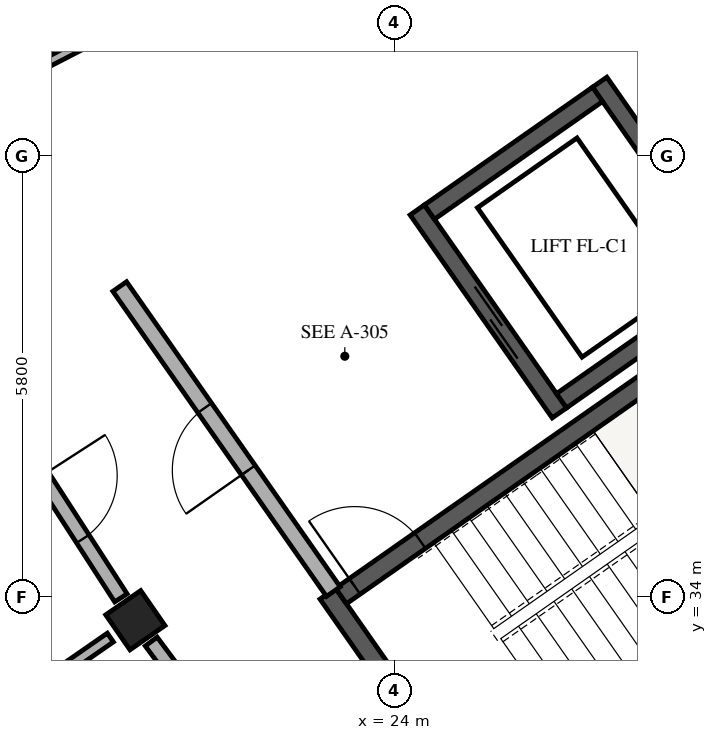
"""IFC4 building model, lengths in metres.
Left out: names, types, materials, properties, quantities, classifications, styles, units other than length and angle.
Written with IfcOpenShell. Run it as: python <this file> out.ifc"""

import sys

from ifc_helpers import new_model, si_unit, direction, frame, frame_2d, origin, origin_2d, place, context, subcontext, project, spatial, rectangle, extrude, element, fill, save


model = new_model("IFC4")
c1 = context("Model", 3, precision=1e-05, world=origin(), true_north=direction((0.0, 1.0)))
c2 = subcontext(c1, "Body", "Model", "MODEL_VIEW")
j1 = project(units=[si_unit("LENGTHUNIT", "METRE"), si_unit("PLANEANGLEUNIT", "RADIAN")], contexts=[c1])
p1 = place(None, origin())
s1 = spatial("IfcSite", under=j1, at=p1, CompositionType="ELEMENT")
p2 = place(p1, origin())
s2 = spatial("IfcBuilding", under=s1, at=p2, CompositionType="ELEMENT")
p3 = place(p2, frame((0.0, 0.0, 8.84)))
s3 = spatial("IfcBuildingStorey", under=s2, at=p3, CompositionType="ELEMENT", Elevation=8.84)
p4 = place(p3, frame((25.114, 31.414, 0.0), z_axis=(0.0, 0.0, 1.0), x_axis=(0.819141541656, 0.573591435374, 0.0)))
e1 = element("IfcWall", 1, at=p4, inside=s3, PredefinedType="SHEAR", context=c2, shape_type="SweptSolid", body=[
    extrude(rectangle(XDim=6.6, YDim=0.25, at=frame_2d((3.3, 0.0))), origin(), (0.0, 0.0, 1.0), 3.11),
])
p5 = place(p3, frame((25.083, 31.24, 0.0), z_axis=(0.0, 0.0, 1.0), x_axis=(-0.573582112484, 0.819148069789, 0.0)))
e2 = element("IfcWall", 2, at=p5, inside=s3, PredefinedType="SHEAR", context=c2, shape_type="SweptSolid", body=[
    extrude(rectangle(XDim=3.42, YDim=0.25, at=frame_2d((1.71, 0.0))), origin(), (0.0, 0.0, 1.0), 3.11),
])
p6 = place(p3, frame((23.296, 34.01, 0.0), z_axis=(0.0, 0.0, 1.0), x_axis=(0.819153711596, 0.573574055182, 0.0)))
e3 = element("IfcWall", 3, at=p6, inside=s3, PredefinedType="SHEAR", context=c2, shape_type="SweptSolid", body=[
    extrude(rectangle(XDim=6.6, YDim=0.25, at=frame_2d((3.3, 0.0))), origin(), (0.0, 0.0, 1.0), 3.11),
])
p7 = place(p6, frame((0.22, 0.0, 0.0)))
e4 = element("IfcOpeningElement", 4, at=p7, cuts=e3, PredefinedType="OPENING", context=c2, shape_type="SweptSolid", body=[
    extrude(rectangle(XDim=1.05, YDim=2.15, at=frame_2d((0.525, 1.075))), frame((0.0, 0.135, 0.0), z_axis=(0.0, -1.0, 0.0), x_axis=(1.0, 0.0, 0.0)), (0.0, 0.0, 1.0), 0.27),
])
p8 = place(p3, frame((26.169, 36.419, 0.0), z_axis=(0.0, 0.0, 1.0), x_axis=(-0.573582966431, 0.819147471839, 0.0)))
e5 = element("IfcWall", 5, at=p8, inside=s3, PredefinedType="SHEAR", context=c2, shape_type="SweptSolid", body=[
    extrude(rectangle(XDim=3.26, YDim=0.23, at=frame_2d((1.63, 0.0))), origin(), (0.0, 0.0, 1.0), 3.11),
])
p9 = place(p8, frame((0.9, 0.0, 0.0)))
e6 = element("IfcOpeningElement", 6, at=p9, cuts=e5, PredefinedType="OPENING", context=c2, shape_type="SweptSolid", body=[
    extrude(rectangle(XDim=1.1, YDim=2.15, at=frame_2d((0.55, 1.075))), frame((0.0, 0.125, 0.0), z_axis=(0.0, -1.0, 0.0), x_axis=(1.0, 0.0, 0.0)), (0.0, 0.0, 1.0), 0.25),
])
p10 = place(p3, frame((28.569, 38.1, 0.0), z_axis=(0.0, 0.0, 1.0), x_axis=(-0.573582966431, 0.819147471839, 0.0)))
e7 = element("IfcWall", 7, at=p10, inside=s3, PredefinedType="SHEAR", context=c2, shape_type="SweptSolid", body=[
    extrude(rectangle(XDim=3.26, YDim=0.23, at=frame_2d((1.63, 0.0))), origin(), (0.0, 0.0, 1.0), 3.11),
])
p11 = place(p3, frame((26.197, 36.579, 0.0), z_axis=(0.0, 0.0, 1.0), x_axis=(0.819159695432, 0.573565509231, 0.0)))
e8 = element("IfcWall", 8, at=p11, inside=s3, PredefinedType="SHEAR", context=c2, shape_type="SweptSolid", body=[
    extrude(rectangle(XDim=2.7, YDim=0.23, at=frame_2d((1.35, 0.0))), origin(), (0.0, 0.0, 1.0), 3.11),
])
p12 = place(p3, frame((24.459, 39.061, 0.0), z_axis=(0.0, 0.0, 1.0), x_axis=(0.819189439894, 0.573523026186, 0.0)))
e9 = element("IfcWall", 9, at=p12, inside=s3, PredefinedType="SHEAR", context=c2, shape_type="SweptSolid", body=[
    extrude(rectangle(XDim=2.7, YDim=0.23, at=frame_2d((1.35, 0.0))), origin(), (0.0, 0.0, 1.0), 3.11),
])
p13 = place(p3, frame((20.59, 33.692, 0.0), z_axis=(0.0, 0.0, 1.0), x_axis=(-0.821646937942, -0.569996762596, 0.0)))
e10 = element("IfcColumn", 10, at=p13, inside=s3, PredefinedType="COLUMN", context=c2, shape_type="SweptSolid", body=[
    extrude(rectangle(XDim=0.56, YDim=0.56, at=origin_2d()), origin(), (0.0, 0.0, 1.0), 3.105),
])
p14 = place(p3, frame((23.195, 34.068, 0.0), z_axis=(0.0, 0.0, 1.0), x_axis=(-0.573572687386, 0.819154669329, 0.0)))
e11 = element("IfcWall", 11, at=p14, inside=s3, PredefinedType="PARTITIONING", context=c2, shape_type="SweptSolid", body=[
    extrude(rectangle(XDim=4.9, YDim=0.22, at=frame_2d((2.45, 0.0))), origin(), (0.0, 0.0, 1.0), 2.34),
])
p15 = place(p14, frame((1.95, 0.0, 0.0)))
e12 = element("IfcOpeningElement", 12, at=p15, cuts=e11, PredefinedType="OPENING", context=c2, shape_type="SweptSolid", body=[
    extrude(rectangle(XDim=1.0, YDim=2.15, at=frame_2d((0.5, 1.075))), frame((0.0, 0.12, 0.0), z_axis=(0.0, -1.0, 0.0), x_axis=(1.0, 0.0, 0.0)), (0.0, 0.0, 1.0), 0.24),
])
p16 = place(p3, frame((25.128, 43.964, 0.0), z_axis=(0.0, 0.0, 1.0), x_axis=(-0.889022010753, -0.457864460727, 0.0)))
e13 = element("IfcWall", 13, at=p16, inside=s3, PredefinedType="PARTITIONING", context=c2, shape_type="SweptSolid", body=[
    extrude(rectangle(XDim=6.6, YDim=0.125, at=frame_2d((3.3, 0.0))), origin(), (0.0, 0.0, 1.0), 2.37),
])
p17 = place(p16, frame((2.865, 0.0, 0.0)))
e14 = element("IfcOpeningElement", 14, at=p17, cuts=e13, PredefinedType="OPENING", context=c2, shape_type="SweptSolid", body=[
    extrude(rectangle(XDim=0.87, YDim=2.08, at=frame_2d((0.435, 1.04))), frame((0.0, 0.073, 0.0), z_axis=(0.0, -1.0, 0.0), x_axis=(1.0, 0.0, 0.0)), (0.0, 0.0, 1.0), 0.145),
])
p18 = place(p3, frame((18.86, 36.368, 0.0), z_axis=(0.0, 0.0, 1.0), x_axis=(0.542787304957, -0.83987019329, 0.0)))
e15 = element("IfcWall", 15, at=p18, inside=s3, PredefinedType="PARTITIONING", context=c2, shape_type="SweptSolid", body=[
    extrude(rectangle(XDim=2.837, YDim=0.195, at=frame_2d((1.418, 0.0))), origin(), (0.0, 0.0, 1.0), 2.37),
])
p19 = place(p18, frame((0.924, 0.0, 0.0)))
e16 = element("IfcOpeningElement", 16, at=p19, cuts=e15, PredefinedType="OPENING", context=c2, shape_type="SweptSolid", body=[
    extrude(rectangle(XDim=0.99, YDim=2.16, at=frame_2d((0.495, 1.08))), frame((0.0, 0.107, 0.0), z_axis=(0.0, -1.0, 0.0), x_axis=(1.0, 0.0, 0.0)), (0.0, 0.0, 1.0), 0.215),
])
p20 = place(p3, frame((20.261, 33.464, 0.0), z_axis=(0.0, 0.0, 1.0), x_axis=(-0.821638260647, -0.570009270663, 0.0)))
e17 = element("IfcWall", 17, at=p20, inside=s3, PredefinedType="PLUMBINGWALL", context=c2, shape_type="SweptSolid", body=[
    extrude(rectangle(XDim=4.7, YDim=0.14, at=frame_2d((2.35, 0.0))), origin(), (0.0, 0.0, 1.0), 2.37),
])
p21 = place(p20, frame((1.925, 0.0, 0.0)))
e18 = element("IfcOpeningElement", 18, at=p21, cuts=e17, PredefinedType="OPENING", context=c2, shape_type="SweptSolid", body=[
    extrude(rectangle(XDim=0.85, YDim=2.05, at=frame_2d((0.425, 1.025))), frame((0.0, 0.08, 0.0), z_axis=(0.0, -1.0, 0.0), x_axis=(1.0, 0.0, 0.0)), (0.0, 0.0, 1.0), 0.16),
])
p22 = place(p3, frame((20.799, 33.411, 0.0), z_axis=(0.0, 0.0, 1.0), x_axis=(0.596552136601, -0.802574325727, 0.0)))
e19 = element("IfcWall", 19, at=p22, inside=s3, PredefinedType="PARTITIONING", context=c2, shape_type="SweptSolid", body=[
    extrude(rectangle(XDim=2.837, YDim=0.195, at=frame_2d((1.418, 0.0))), origin(), (0.0, 0.0, 1.0), 2.37),
])
p23 = place(p22, frame((0.934, 0.0, 0.0)))
e20 = element("IfcOpeningElement", 20, at=p23, cuts=e19, PredefinedType="OPENING", context=c2, shape_type="SweptSolid", body=[
    extrude(rectangle(XDim=0.97, YDim=2.15, at=frame_2d((0.485, 1.075))), frame((0.0, 0.107, 0.0), z_axis=(0.0, -1.0, 0.0), x_axis=(1.0, 0.0, 0.0)), (0.0, 0.0, 1.0), 0.215),
])
p24 = place(p3, frame((31.801, 34.344, 0.0), z_axis=(0.0, 0.0, 1.0), x_axis=(-0.74023124711, -0.672352363573, 0.0)))
e21 = element("IfcWall", 21, at=p24, inside=s3, PredefinedType="PARTITIONING", context=c2, shape_type="SweptSolid", body=[
    extrude(rectangle(XDim=6.6, YDim=0.125, at=frame_2d((3.3, 0.0))), origin(), (0.0, 0.0, 1.0), 2.37),
])
p25 = place(p24, frame((2.845, 0.0, 0.0)))
e22 = element("IfcOpeningElement", 22, at=p25, cuts=e21, PredefinedType="OPENING", context=c2, shape_type="SweptSolid", body=[
    extrude(rectangle(XDim=0.91, YDim=2.1, at=frame_2d((0.455, 1.05))), frame((0.0, 0.073, 0.0), z_axis=(0.0, -1.0, 0.0), x_axis=(1.0, 0.0, 0.0)), (0.0, 0.0, 1.0), 0.145),
])
p26 = place(p7, origin())
e23 = element("IfcDoor", 23, at=p26, inside=s3, OperationType="SINGLE_SWING_LEFT", PredefinedType="DOOR", context=c2, shape_type="SweptSolid", body=[
    extrude(rectangle(XDim=1.05, YDim=2.15, at=frame_2d((0.525, 1.075))), frame((0.0, 0.025, 0.0), z_axis=(0.0, -1.0, 0.0), x_axis=(1.0, 0.0, 0.0)), (0.0, 0.0, 1.0), 0.05),
])
fill(e4, e23)
p27 = place(p9, origin())
e24 = element("IfcDoor", 24, at=p27, inside=s3, OperationType="DOUBLE_DOOR_SLIDING", PredefinedType="DOOR", context=c2, shape_type="SweptSolid", body=[
    extrude(rectangle(XDim=1.1, YDim=2.15, at=frame_2d((0.55, 1.075))), frame((0.0, 0.025, 0.0), z_axis=(0.0, -1.0, 0.0), x_axis=(1.0, 0.0, 0.0)), (0.0, 0.0, 1.0), 0.05),
])
fill(e6, e24)
p28 = place(p15, origin())
e25 = element("IfcDoor", 25, at=p28, inside=s3, OperationType="SINGLE_SWING_LEFT", PredefinedType="DOOR", context=c2, shape_type="SweptSolid", body=[
    extrude(rectangle(XDim=1.0, YDim=2.15, at=frame_2d((0.5, 1.075))), frame((0.0, 0.025, 0.0), z_axis=(0.0, -1.0, 0.0), x_axis=(1.0, 0.0, 0.0)), (0.0, 0.0, 1.0), 0.05),
])
fill(e12, e25)
p29 = place(p19, origin())
e26 = element("IfcDoor", 26, at=p29, inside=s3, OperationType="SINGLE_SWING_LEFT", PredefinedType="DOOR", context=c2, shape_type="SweptSolid", body=[
    extrude(rectangle(XDim=0.99, YDim=2.16, at=frame_2d((0.495, 1.08))), frame((0.0, 0.025, 0.0), z_axis=(0.0, -1.0, 0.0), x_axis=(1.0, 0.0, 0.0)), (0.0, 0.0, 1.0), 0.05),
])
fill(e16, e26)
save(model, sys.argv[1])
